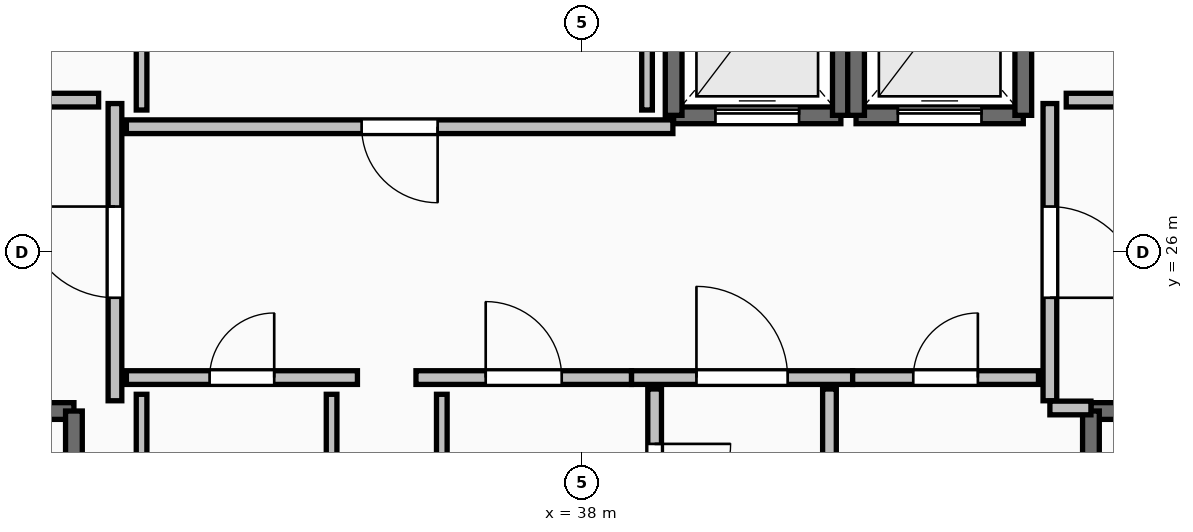
"""IFC4 building model, lengths in metres.
Left out: names, types, materials, properties, quantities, classifications, styles, units other than length and angle.
Written with IfcOpenShell. Run it as: python <this file> out.ifc"""

import sys

from ifc_helpers import new_model, si_unit, direction, frame, frame_2d, origin, place, context, subcontext, project, spatial, rectangle, extrude, element, fill, save


model = new_model("IFC4")
c1 = context("Model", 3, precision=1e-05, world=origin(), true_north=direction((0.0, 1.0)))
c2 = subcontext(c1, "Body", "Model", "MODEL_VIEW")
j1 = project(units=[si_unit("LENGTHUNIT", "METRE"), si_unit("PLANEANGLEUNIT", "RADIAN")], contexts=[c1])
p1 = place(None, origin())
s1 = spatial("IfcSite", under=j1, at=p1, CompositionType="ELEMENT")
p2 = place(p1, origin())
s2 = spatial("IfcBuilding", under=s1, at=p2, CompositionType="ELEMENT")
p3 = place(p2, frame((0.0, 0.0, 241.35)))
s3 = spatial("IfcBuildingStorey", under=s2, at=p3, CompositionType="ELEMENT", Elevation=241.35)
p4 = place(p3, frame((27.94, 23.91, 0.0), z_axis=(0.0, 0.0, 1.0), x_axis=(1.0, 0.0, 0.0)))
e1 = element("IfcWall", 1, at=p4, inside=s3, PredefinedType="SOLIDWALL", context=c2, shape_type="SweptSolid", body=[
    extrude(rectangle(XDim=3.37, YDim=0.22, at=frame_2d((1.685, 0.0))), origin(), (0.0, 0.0, 1.0), 3.29),
])
p5 = place(p4, frame((1.135, 0.0, 0.0)))
e2 = element("IfcOpeningElement", 2, at=p5, cuts=e1, PredefinedType="OPENING", context=c2, shape_type="SweptSolid", body=[
    extrude(rectangle(XDim=1.1, YDim=2.15, at=frame_2d((0.55, 1.075))), frame((0.0, 0.125, 0.0), z_axis=(0.0, -1.0, 0.0), x_axis=(1.0, 0.0, 0.0)), (0.0, 0.0, 1.0), 0.25),
])
p6 = place(p3, frame((31.31, 23.91, 0.0), z_axis=(0.0, 0.0, 1.0), x_axis=(0.0, -1.0, 0.0)))
e3 = element("IfcWall", 3, at=p6, inside=s3, PredefinedType="SOLIDWALL", context=c2, shape_type="SweptSolid", body=[
    extrude(rectangle(XDim=7.42, YDim=0.22, at=frame_2d((3.71, 0.0))), origin(), (0.0, 0.0, 1.0), 3.29),
])
p7 = place(p3, frame((44.69, 23.91, 0.0), z_axis=(0.0, 0.0, 1.0), x_axis=(1.0, 0.0, 0.0)))
e4 = element("IfcWall", 4, at=p7, inside=s3, PredefinedType="SOLIDWALL", context=c2, shape_type="SweptSolid", body=[
    extrude(rectangle(XDim=3.37, YDim=0.22, at=frame_2d((1.685, 0.0))), origin(), (0.0, 0.0, 1.0), 3.29),
])
p8 = place(p7, frame((1.135, 0.0, 0.0)))
e5 = element("IfcOpeningElement", 5, at=p8, cuts=e4, PredefinedType="OPENING", context=c2, shape_type="SweptSolid", body=[
    extrude(rectangle(XDim=1.1, YDim=2.15, at=frame_2d((0.55, 1.075))), frame((0.0, 0.125, 0.0), z_axis=(0.0, -1.0, 0.0), x_axis=(1.0, 0.0, 0.0)), (0.0, 0.0, 1.0), 0.25),
])
p9 = place(p3, frame((44.69, 16.49, 0.0), z_axis=(0.0, 0.0, 1.0), x_axis=(0.0, 1.0, 0.0)))
e6 = element("IfcWall", 6, at=p9, inside=s3, PredefinedType="SOLIDWALL", context=c2, shape_type="SweptSolid", body=[
    extrude(rectangle(XDim=7.42, YDim=0.22, at=frame_2d((3.71, 0.0))), origin(), (0.0, 0.0, 1.0), 3.29),
])
p10 = place(p3, frame((39.2, 27.8, 0.0), z_axis=(0.0, 0.0, 1.0), x_axis=(1.0, 0.0, 0.0)))
e7 = element("IfcWall", 7, at=p10, inside=s3, PredefinedType="SOLIDWALL", context=c2, shape_type="SweptSolid", body=[
    extrude(rectangle(XDim=2.2, YDim=0.22, at=frame_2d((1.1, 0.0))), origin(), (0.0, 0.0, 1.0), 3.29),
])
p11 = place(p10, frame((0.55, 0.0, 0.0)))
e8 = element("IfcOpeningElement", 8, at=p11, cuts=e7, PredefinedType="OPENING", context=c2, shape_type="SweptSolid", body=[
    extrude(rectangle(XDim=1.1, YDim=2.2, at=frame_2d((0.55, 1.1))), frame((0.0, 0.125, 0.0), z_axis=(0.0, -1.0, 0.0), x_axis=(1.0, 0.0, 0.0)), (0.0, 0.0, 1.0), 0.25),
])
for number, where, z_axis, x_axis in (
    (9, (41.4, 27.8, 0.0), (0.0, 0.0, 1.0), (0.0, 1.0, 0.0)),
    (10, (39.2, 30.4, 0.0), (0.0, 0.0, 1.0), (0.0, -1.0, 0.0)),
):
    element("IfcWall", number, at=place(p3, frame(where, z_axis=z_axis, x_axis=x_axis)), inside=s3, PredefinedType="SOLIDWALL", context=c2, shape_type="SweptSolid", body=[
        extrude(rectangle(XDim=2.6, YDim=0.22, at=frame_2d((1.3, 0.0))), origin(), (0.0, 0.0, 1.0), 3.29),
    ])
p12 = place(p3, frame((41.6, 27.8, 0.0), z_axis=(0.0, 0.0, 1.0), x_axis=(1.0, 0.0, 0.0)))
e11 = element("IfcWall", 11, at=p12, inside=s3, PredefinedType="SOLIDWALL", context=c2, shape_type="SweptSolid", body=[
    extrude(rectangle(XDim=2.2, YDim=0.22, at=frame_2d((1.1, 0.0))), origin(), (0.0, 0.0, 1.0), 3.29),
])
p13 = place(p12, frame((0.55, 0.0, 0.0)))
e12 = element("IfcOpeningElement", 12, at=p13, cuts=e11, PredefinedType="OPENING", context=c2, shape_type="SweptSolid", body=[
    extrude(rectangle(XDim=1.1, YDim=2.2, at=frame_2d((0.55, 1.1))), frame((0.0, 0.125, 0.0), z_axis=(0.0, -1.0, 0.0), x_axis=(1.0, 0.0, 0.0)), (0.0, 0.0, 1.0), 0.25),
])
for number, where, z_axis, x_axis in (
    (13, (43.8, 27.8, 0.0), (0.0, 0.0, 1.0), (0.0, 1.0, 0.0)),
    (14, (41.6, 30.4, 0.0), (0.0, 0.0, 1.0), (0.0, -1.0, 0.0)),
):
    element("IfcWall", number, at=place(p3, frame(where, z_axis=z_axis, x_axis=x_axis)), inside=s3, PredefinedType="SOLIDWALL", context=c2, shape_type="SweptSolid", body=[
        extrude(rectangle(XDim=2.6, YDim=0.22, at=frame_2d((1.3, 0.0))), origin(), (0.0, 0.0, 1.0), 3.29),
    ])
p14 = place(p3, frame((31.85, 24.045, 0.0), z_axis=(0.0, 0.0, 1.0), x_axis=(0.0, 1.0, 0.0)))
e15 = element("IfcWall", 15, at=p14, inside=s3, PredefinedType="PARTITIONING", context=c2, shape_type="SweptSolid", body=[
    extrude(rectangle(XDim=3.91, YDim=0.18, at=frame_2d((1.955, 0.0))), origin(), (0.0, 0.0, 1.0), 3.29),
])
p15 = place(p14, frame((1.355, 0.0, 0.0)))
e16 = element("IfcOpeningElement", 16, at=p15, cuts=e15, PredefinedType="OPENING", context=c2, shape_type="SweptSolid", body=[
    extrude(rectangle(XDim=1.2, YDim=2.15, at=frame_2d((0.6, 1.075))), frame((0.0, 0.105, 0.0), z_axis=(0.0, -1.0, 0.0), x_axis=(1.0, 0.0, 0.0)), (0.0, 0.0, 1.0), 0.21),
])
p16 = place(p3, frame((44.15, 27.955, 0.0), z_axis=(0.0, 0.0, 1.0), x_axis=(0.0, -1.0, 0.0)))
e17 = element("IfcWall", 17, at=p16, inside=s3, PredefinedType="PARTITIONING", context=c2, shape_type="SweptSolid", body=[
    extrude(rectangle(XDim=3.91, YDim=0.18, at=frame_2d((1.955, 0.0))), origin(), (0.0, 0.0, 1.0), 3.29),
])
p17 = place(p16, frame((1.355, 0.0, 0.0)))
e18 = element("IfcOpeningElement", 18, at=p17, cuts=e17, PredefinedType="OPENING", context=c2, shape_type="SweptSolid", body=[
    extrude(rectangle(XDim=1.2, YDim=2.15, at=frame_2d((0.6, 1.075))), frame((0.0, 0.105, 0.0), z_axis=(0.0, -1.0, 0.0), x_axis=(1.0, 0.0, 0.0)), (0.0, 0.0, 1.0), 0.21),
])
p18 = place(p3, frame((44.15, 23.95, 0.0), z_axis=(0.0, 0.0, 1.0), x_axis=(1.0, 0.0, 0.0)))
e19 = element("IfcWall", 19, at=p18, inside=s3, PredefinedType="PARTITIONING", context=c2, shape_type="SweptSolid", body=[
    extrude(rectangle(XDim=0.54, YDim=0.18, at=frame_2d((0.27, 0.0))), origin(), (0.0, 0.0, 1.0), 3.29),
])
p19 = place(p3, frame((38.645, 24.35, 0.0), z_axis=(0.0, 0.0, 1.0), x_axis=(1.0, 0.0, 0.0)))
e20 = element("IfcWall", 20, at=p19, inside=s3, PredefinedType="PARTITIONING", context=c2, shape_type="SweptSolid", body=[
    extrude(rectangle(XDim=2.91, YDim=0.18, at=frame_2d((1.455, 0.0))), origin(), (0.0, 0.0, 1.0), 3.29),
])
p20 = place(p19, frame((0.855, 0.0, 0.0)))
e21 = element("IfcOpeningElement", 21, at=p20, cuts=e20, PredefinedType="OPENING", context=c2, shape_type="SweptSolid", body=[
    extrude(rectangle(XDim=1.2, YDim=2.15, at=frame_2d((0.6, 1.075))), frame((0.0, 0.105, 0.0), z_axis=(0.0, -1.0, 0.0), x_axis=(1.0, 0.0, 0.0)), (0.0, 0.0, 1.0), 0.21),
])
p21 = place(p3, frame((41.555, 24.35, 0.0), z_axis=(0.0, 0.0, 1.0), x_axis=(1.0, 0.0, 0.0)))
e22 = element("IfcWall", 22, at=p21, inside=s3, PredefinedType="PARTITIONING", context=c2, shape_type="SweptSolid", body=[
    extrude(rectangle(XDim=2.445, YDim=0.18, at=frame_2d((1.223, 0.0))), origin(), (0.0, 0.0, 1.0), 3.29),
])
p22 = place(p21, frame((0.798, 0.0, 0.0)))
e23 = element("IfcOpeningElement", 23, at=p22, cuts=e22, PredefinedType="OPENING", context=c2, shape_type="SweptSolid", body=[
    extrude(rectangle(XDim=0.85, YDim=2.1, at=frame_2d((0.425, 1.05))), frame((0.0, 0.105, 0.0), z_axis=(0.0, -1.0, 0.0), x_axis=(1.0, 0.0, 0.0)), (0.0, 0.0, 1.0), 0.21),
])
p23 = place(p3, frame((39.19, 27.65, 0.0), z_axis=(0.0, 0.0, 1.0), x_axis=(-1.0, 0.0, 0.0)))
e24 = element("IfcWall", 24, at=p23, inside=s3, PredefinedType="PARTITIONING", context=c2, shape_type="SweptSolid", body=[
    extrude(rectangle(XDim=7.19, YDim=0.18, at=frame_2d((3.595, 0.0))), origin(), (0.0, 0.0, 1.0), 3.29),
])
p24 = place(p23, frame((3.095, 0.0, 0.0)))
e25 = element("IfcOpeningElement", 25, at=p24, cuts=e24, PredefinedType="OPENING", context=c2, shape_type="SweptSolid", body=[
    extrude(rectangle(XDim=1.0, YDim=2.15, at=frame_2d((0.5, 1.075))), frame((0.0, 0.105, 0.0), z_axis=(0.0, -1.0, 0.0), x_axis=(1.0, 0.0, 0.0)), (0.0, 0.0, 1.0), 0.21),
])
p25 = place(p3, frame((32.0, 24.35, 0.0), z_axis=(0.0, 0.0, 1.0), x_axis=(1.0, 0.0, 0.0)))
e26 = element("IfcWall", 26, at=p25, inside=s3, PredefinedType="PARTITIONING", context=c2, shape_type="SweptSolid", body=[
    extrude(rectangle(XDim=3.04, YDim=0.18, at=frame_2d((1.52, 0.0))), origin(), (0.0, 0.0, 1.0), 3.29),
])
p26 = place(p25, frame((1.095, 0.0, 0.0)))
e27 = element("IfcOpeningElement", 27, at=p26, cuts=e26, PredefinedType="OPENING", context=c2, shape_type="SweptSolid", body=[
    extrude(rectangle(XDim=0.85, YDim=2.1, at=frame_2d((0.425, 1.05))), frame((0.0, 0.105, 0.0), z_axis=(0.0, -1.0, 0.0), x_axis=(1.0, 0.0, 0.0)), (0.0, 0.0, 1.0), 0.21),
])
p27 = place(p3, frame((35.81, 24.35, 0.0), z_axis=(0.0, 0.0, 1.0), x_axis=(1.0, 0.0, 0.0)))
e28 = element("IfcWall", 28, at=p27, inside=s3, PredefinedType="PARTITIONING", context=c2, shape_type="SweptSolid", body=[
    extrude(rectangle(XDim=2.835, YDim=0.18, at=frame_2d((1.417, 0.0))), origin(), (0.0, 0.0, 1.0), 3.29),
])
p28 = place(p27, frame((0.917, 0.0, 0.0)))
e29 = element("IfcOpeningElement", 29, at=p28, cuts=e28, PredefinedType="OPENING", context=c2, shape_type="SweptSolid", body=[
    extrude(rectangle(XDim=1.0, YDim=2.15, at=frame_2d((0.5, 1.075))), frame((0.0, 0.105, 0.0), z_axis=(0.0, -1.0, 0.0), x_axis=(1.0, 0.0, 0.0)), (0.0, 0.0, 1.0), 0.21),
])
p29 = place(p3, frame((41.25, 20.305, 0.0), z_axis=(0.0, 0.0, 1.0), x_axis=(0.0, 1.0, 0.0)))
e30 = element("IfcWall", 30, at=p29, inside=s3, PredefinedType="PARTITIONING", context=c2, shape_type="SweptSolid", body=[
    extrude(rectangle(XDim=3.895, YDim=0.18, at=frame_2d((1.948, 0.0))), origin(), (0.0, 0.0, 1.0), 2.482),
])
p30 = place(p29, frame((1.522, 0.0, 0.0)))
e31 = element("IfcOpeningElement", 31, at=p30, cuts=e30, PredefinedType="OPENING", context=c2, shape_type="SweptSolid", body=[
    extrude(rectangle(XDim=0.85, YDim=2.1, at=frame_2d((0.425, 1.05))), frame((0.0, 0.105, 0.0), z_axis=(0.0, -1.0, 0.0), x_axis=(1.0, 0.0, 0.0)), (0.0, 0.0, 1.0), 0.21),
])
p31 = place(p3, frame((38.95, 24.2, 0.0), z_axis=(0.0, 0.0, 1.0), x_axis=(0.0, -1.0, 0.0)))
e32 = element("IfcWall", 32, at=p31, inside=s3, PredefinedType="PARTITIONING", context=c2, shape_type="SweptSolid", body=[
    extrude(rectangle(XDim=2.445, YDim=0.18, at=frame_2d((1.223, 0.0))), origin(), (0.0, 0.0, 1.0), 2.482),
])
p32 = place(p31, frame((0.722, 0.0, 0.0)))
e33 = element("IfcOpeningElement", 33, at=p32, cuts=e32, PredefinedType="OPENING", context=c2, shape_type="SweptSolid", body=[
    extrude(rectangle(XDim=1.0, YDim=2.15, at=frame_2d((0.5, 1.075))), frame((0.0, 0.105, 0.0), z_axis=(0.0, -1.0, 0.0), x_axis=(1.0, 0.0, 0.0)), (0.0, 0.0, 1.0), 0.21),
])
for number, where, z_axis, x_axis in (
    (34, (31.635, 28.0, 0.0), (0.0, 0.0, 1.0), (-1.0, 0.0, 0.0)),
    (35, (45.28, 28.0, 0.0), (0.0, 0.0, 1.0), (-1.0, 0.0, 0.0)),
):
    element("IfcWall", number, at=place(p3, frame(where, z_axis=z_axis, x_axis=x_axis)), inside=s3, PredefinedType="PARTITIONING", context=c2, shape_type="SweptSolid", body=[
        extrude(rectangle(XDim=0.915, YDim=0.18, at=frame_2d((0.458, 0.0))), origin(), (0.0, 0.0, 1.0), 3.29),
    ])
for number, where, z_axis, x_axis in (
    (36, (32.2, 30.26, 0.0), (0.0, 0.0, 1.0), (0.0, -1.0, 0.0)),
    (37, (38.85, 27.87, 0.0), (0.0, 0.0, 1.0), (0.0, 1.0, 0.0)),
):
    element("IfcWall", number, at=place(p3, frame(where, z_axis=z_axis, x_axis=x_axis)), inside=s3, PredefinedType="PARTITIONING", context=c2, shape_type="SweptSolid", body=[
        extrude(rectangle(XDim=2.39, YDim=0.14, at=frame_2d((1.195, 0.0))), origin(), (0.0, 0.0, 1.0), 3.29),
    ])
for number, where, z_axis, x_axis in (
    (38, (32.2, 24.13, 0.0), (0.0, 0.0, 1.0), (0.0, -1.0, 0.0)),
    (39, (34.7, 21.67, 0.0), (0.0, 0.0, 1.0), (0.0, 1.0, 0.0)),
    (40, (36.15, 24.13, 0.0), (0.0, 0.0, 1.0), (0.0, -1.0, 0.0)),
):
    element("IfcWall", number, at=place(p3, frame(where, z_axis=z_axis, x_axis=x_axis)), inside=s3, PredefinedType="PARTITIONING", context=c2, shape_type="SweptSolid", body=[
        extrude(rectangle(XDim=2.46, YDim=0.14, at=frame_2d((1.23, 0.0))), origin(), (0.0, 0.0, 1.0), 2.482),
    ])
p33 = place(p11, origin())
e41 = element("IfcDoor", 41, at=p33, inside=s3, OperationType="SLIDING_TO_LEFT", PredefinedType="DOOR", context=c2, shape_type="SweptSolid", body=[
    extrude(rectangle(XDim=1.1, YDim=2.2, at=frame_2d((0.55, 1.1))), frame((0.0, 0.025, 0.0), z_axis=(0.0, -1.0, 0.0), x_axis=(1.0, 0.0, 0.0)), (0.0, 0.0, 1.0), 0.05),
])
fill(e8, e41)
p34 = place(p13, origin())
e42 = element("IfcDoor", 42, at=p34, inside=s3, OperationType="SLIDING_TO_LEFT", PredefinedType="DOOR", context=c2, shape_type="SweptSolid", body=[
    extrude(rectangle(XDim=1.1, YDim=2.2, at=frame_2d((0.55, 1.1))), frame((0.0, 0.025, 0.0), z_axis=(0.0, -1.0, 0.0), x_axis=(1.0, 0.0, 0.0)), (0.0, 0.0, 1.0), 0.05),
])
fill(e12, e42)
p35 = place(p15, origin())
e43 = element("IfcDoor", 43, at=p35, inside=s3, OperationType="SINGLE_SWING_RIGHT", PredefinedType="DOOR", context=c2, shape_type="SweptSolid", body=[
    extrude(rectangle(XDim=1.2, YDim=2.15, at=frame_2d((0.6, 1.075))), frame((0.0, 0.025, 0.0), z_axis=(0.0, -1.0, 0.0), x_axis=(1.0, 0.0, 0.0)), (0.0, 0.0, 1.0), 0.05),
])
fill(e16, e43)
p36 = place(p17, origin())
e44 = element("IfcDoor", 44, at=p36, inside=s3, OperationType="SINGLE_SWING_RIGHT", PredefinedType="DOOR", context=c2, shape_type="SweptSolid", body=[
    extrude(rectangle(XDim=1.2, YDim=2.15, at=frame_2d((0.6, 1.075))), frame((0.0, 0.025, 0.0), z_axis=(0.0, -1.0, 0.0), x_axis=(1.0, 0.0, 0.0)), (0.0, 0.0, 1.0), 0.05),
])
fill(e18, e44)
p37 = place(p20, origin())
e45 = element("IfcDoor", 45, at=p37, inside=s3, OperationType="SINGLE_SWING_LEFT", PredefinedType="DOOR", context=c2, shape_type="SweptSolid", body=[
    extrude(rectangle(XDim=1.2, YDim=2.15, at=frame_2d((0.6, 1.075))), frame((0.0, 0.025, 0.0), z_axis=(0.0, -1.0, 0.0), x_axis=(1.0, 0.0, 0.0)), (0.0, 0.0, 1.0), 0.05),
])
fill(e21, e45)
p38 = place(p22, origin())
e46 = element("IfcDoor", 46, at=p38, inside=s3, OperationType="SINGLE_SWING_RIGHT", PredefinedType="DOOR", context=c2, shape_type="SweptSolid", body=[
    extrude(rectangle(XDim=0.85, YDim=2.1, at=frame_2d((0.425, 1.05))), frame((0.0, 0.025, 0.0), z_axis=(0.0, -1.0, 0.0), x_axis=(1.0, 0.0, 0.0)), (0.0, 0.0, 1.0), 0.05),
])
fill(e23, e46)
p39 = place(p24, origin())
e47 = element("IfcDoor", 47, at=p39, inside=s3, OperationType="SINGLE_SWING_LEFT", PredefinedType="DOOR", context=c2, shape_type="SweptSolid", body=[
    extrude(rectangle(XDim=1.0, YDim=2.15, at=frame_2d((0.5, 1.075))), frame((0.0, 0.025, 0.0), z_axis=(0.0, -1.0, 0.0), x_axis=(1.0, 0.0, 0.0)), (0.0, 0.0, 1.0), 0.05),
])
fill(e25, e47)
p40 = place(p26, origin())
e48 = element("IfcDoor", 48, at=p40, inside=s3, OperationType="SINGLE_SWING_RIGHT", PredefinedType="DOOR", context=c2, shape_type="SweptSolid", body=[
    extrude(rectangle(XDim=0.85, YDim=2.1, at=frame_2d((0.425, 1.05))), frame((0.0, 0.025, 0.0), z_axis=(0.0, -1.0, 0.0), x_axis=(1.0, 0.0, 0.0)), (0.0, 0.0, 1.0), 0.05),
])
fill(e27, e48)
p41 = place(p28, origin())
e49 = element("IfcDoor", 49, at=p41, inside=s3, OperationType="SINGLE_SWING_LEFT", PredefinedType="DOOR", context=c2, shape_type="SweptSolid", body=[
    extrude(rectangle(XDim=1.0, YDim=2.15, at=frame_2d((0.5, 1.075))), frame((0.0, 0.025, 0.0), z_axis=(0.0, -1.0, 0.0), x_axis=(1.0, 0.0, 0.0)), (0.0, 0.0, 1.0), 0.05),
])
fill(e29, e49)
p42 = place(p32, origin())
e50 = element("IfcDoor", 50, at=p42, inside=s3, OperationType="SINGLE_SWING_LEFT", PredefinedType="DOOR", context=c2, shape_type="SweptSolid", body=[
    extrude(rectangle(XDim=1.0, YDim=2.15, at=frame_2d((0.5, 1.075))), frame((0.0, 0.025, 0.0), z_axis=(0.0, -1.0, 0.0), x_axis=(1.0, 0.0, 0.0)), (0.0, 0.0, 1.0), 0.05),
])
fill(e33, e50)
save(model, sys.argv[1])
